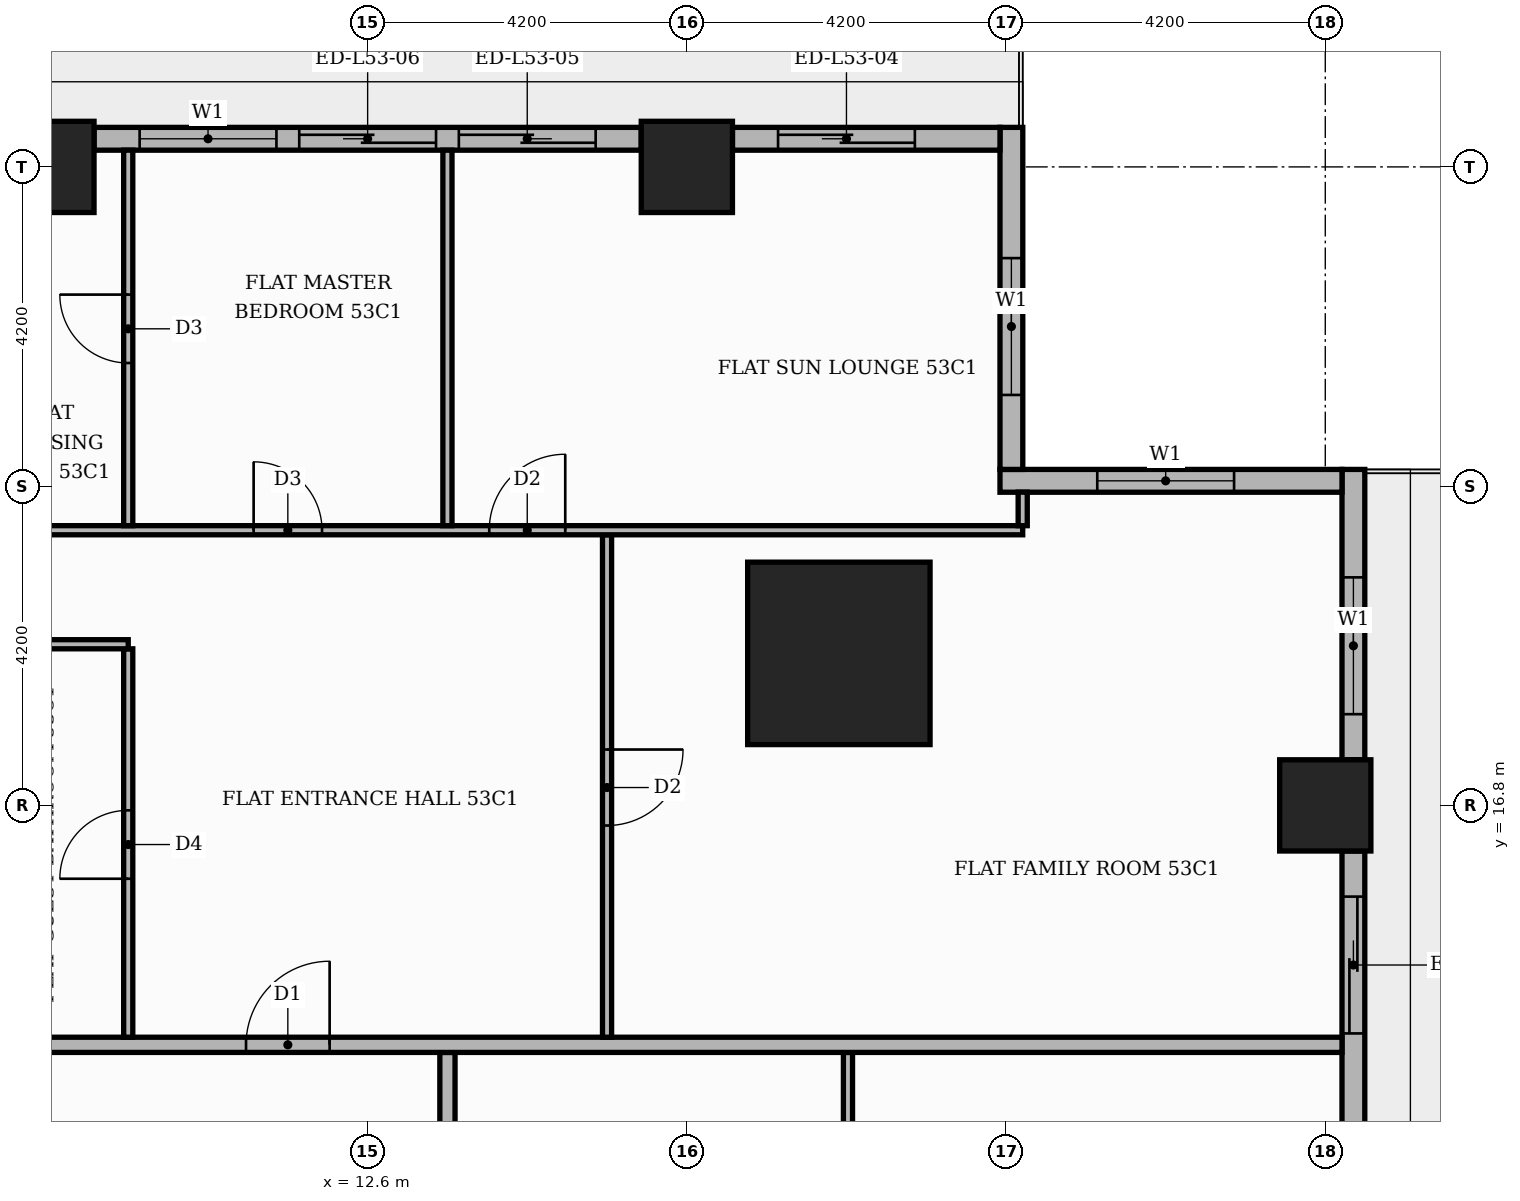
"""IFC4 building model, lengths in metres.
Left out: names, types, materials, properties, quantities, classifications, styles, units other than length and angle.
Written with IfcOpenShell. Run it as: python <this file> out.ifc"""

import sys

from ifc_helpers import new_model, si_unit, direction, frame, frame_2d, origin, origin_2d, place, context, subcontext, project, spatial, rectangle, extrude, element, fill, save


model = new_model("IFC4")
c1 = context("Model", 3, precision=1e-05, world=origin(), true_north=direction((0.0, 1.0)))
c2 = subcontext(c1, "Body", "Model", "MODEL_VIEW")
j1 = project(units=[si_unit("LENGTHUNIT", "METRE"), si_unit("PLANEANGLEUNIT", "RADIAN")], contexts=[c1])
p1 = place(None, origin())
s1 = spatial("IfcSite", under=j1, at=p1, CompositionType="ELEMENT")
p2 = place(p1, origin())
s2 = spatial("IfcBuilding", under=s1, at=p2, CompositionType="ELEMENT")
p3 = place(p2, frame((0.0, 0.0, 223.5)))
s3 = spatial("IfcBuildingStorey", under=s2, at=p3, CompositionType="ELEMENT", Elevation=223.5)
p4 = place(p3, frame((18.8, 18.8, 0.0), z_axis=(0.0, 0.0, 1.0), x_axis=(1.0, 0.0, 0.0)))
e1 = element("IfcColumn", 1, at=p4, inside=s3, PredefinedType="COLUMN", context=c2, shape_type="SweptSolid", body=[
    extrude(rectangle(XDim=2.4, YDim=2.4, at=origin_2d()), origin(), (0.0, 0.0, 1.0), 3.9),
])
for number, where, z_axis, x_axis in (
    (2, (25.2, 16.8, 0.0), (0.0, 0.0, 1.0), (1.0, 0.0, 0.0)),
    (3, (8.4, 25.2, 0.0), (0.0, 0.0, 1.0), (1.0, 0.0, 0.0)),
    (4, (16.8, 25.2, 0.0), (0.0, 0.0, 1.0), (1.0, 0.0, 0.0)),
):
    element("IfcColumn", number, at=place(p3, frame(where, z_axis=z_axis, x_axis=x_axis)), inside=s3, PredefinedType="COLUMN", context=c2, shape_type="SweptSolid", body=[
        extrude(rectangle(XDim=1.2, YDim=1.2, at=origin_2d()), origin(), (0.0, 0.0, 1.0), 3.9),
    ])
p5 = place(p3, frame((25.57, 11.85, 0.0), z_axis=(0.0, 0.0, 1.0), x_axis=(0.0, 1.0, 0.0)))
e5 = element("IfcWall", 5, at=p5, inside=s3, PredefinedType="STANDARD", context=c2, shape_type="SweptSolid", body=[
    extrude(rectangle(XDim=4.35, YDim=0.3, at=frame_2d((2.175, 0.0))), origin(), (0.0, 0.0, 1.0), 3.48),
])
p6 = place(p5, frame((1.95, 0.0, 0.0)))
e6 = element("IfcOpeningElement", 6, at=p6, cuts=e5, PredefinedType="OPENING", context=c2, shape_type="SweptSolid", body=[
    extrude(rectangle(XDim=1.8, YDim=2.4, at=frame_2d((0.9, 1.2))), frame((0.0, 0.16, 0.0), z_axis=(0.0, -1.0, 0.0), x_axis=(1.0, 0.0, 0.0)), (0.0, 0.0, 1.0), 0.32),
])
p7 = place(p3, frame((25.57, 17.4, 0.0), z_axis=(0.0, 0.0, 1.0), x_axis=(0.0, 1.0, 0.0)))
e7 = element("IfcWall", 7, at=p7, inside=s3, PredefinedType="STANDARD", context=c2, shape_type="SweptSolid", body=[
    extrude(rectangle(XDim=3.82, YDim=0.3, at=frame_2d((1.91, 0.0))), origin(), (0.0, 0.0, 1.0), 3.48),
])
p8 = place(p7, frame((0.6, 0.0, 0.9)))
e8 = element("IfcOpeningElement", 8, at=p8, cuts=e7, PredefinedType="OPENING", context=c2, shape_type="SweptSolid", body=[
    extrude(rectangle(XDim=1.8, YDim=2.1, at=frame_2d((0.9, 1.05))), frame((0.0, 0.16, 0.0), z_axis=(0.0, -1.0, 0.0), x_axis=(1.0, 0.0, 0.0)), (0.0, 0.0, 1.0), 0.32),
])
p9 = place(p3, frame((25.42, 21.07, 0.0), z_axis=(0.0, 0.0, 1.0), x_axis=(-1.0, 0.0, 0.0)))
e9 = element("IfcWall", 9, at=p9, inside=s3, PredefinedType="STANDARD", context=c2, shape_type="SweptSolid", body=[
    extrude(rectangle(XDim=4.5, YDim=0.3, at=frame_2d((2.25, 0.0))), origin(), (0.0, 0.0, 1.0), 3.48),
])
p10 = place(p9, frame((1.42, 0.0, 0.9)))
e10 = element("IfcOpeningElement", 10, at=p10, cuts=e9, PredefinedType="OPENING", context=c2, shape_type="SweptSolid", body=[
    extrude(rectangle(XDim=1.8, YDim=2.1, at=frame_2d((0.9, 1.05))), frame((0.0, 0.16, 0.0), z_axis=(0.0, -1.0, 0.0), x_axis=(1.0, 0.0, 0.0)), (0.0, 0.0, 1.0), 0.32),
])
p11 = place(p3, frame((21.07, 21.22, 0.0), z_axis=(0.0, 0.0, 1.0), x_axis=(0.0, 1.0, 0.0)))
e11 = element("IfcWall", 11, at=p11, inside=s3, PredefinedType="STANDARD", context=c2, shape_type="SweptSolid", body=[
    extrude(rectangle(XDim=4.5, YDim=0.3, at=frame_2d((2.25, 0.0))), origin(), (0.0, 0.0, 1.0), 3.48),
])
p12 = place(p11, frame((0.98, 0.0, 0.9)))
e12 = element("IfcOpeningElement", 12, at=p12, cuts=e11, PredefinedType="OPENING", context=c2, shape_type="SweptSolid", body=[
    extrude(rectangle(XDim=1.8, YDim=2.1, at=frame_2d((0.9, 1.05))), frame((0.0, 0.16, 0.0), z_axis=(0.0, -1.0, 0.0), x_axis=(1.0, 0.0, 0.0)), (0.0, 0.0, 1.0), 0.32),
])
p13 = place(p3, frame((20.92, 25.57, 0.0), z_axis=(0.0, 0.0, 1.0), x_axis=(-1.0, 0.0, 0.0)))
e13 = element("IfcWall", 13, at=p13, inside=s3, PredefinedType="STANDARD", context=c2, shape_type="SweptSolid", body=[
    extrude(rectangle(XDim=3.52, YDim=0.3, at=frame_2d((1.76, 0.0))), origin(), (0.0, 0.0, 1.0), 3.48),
])
p14 = place(p13, frame((1.12, 0.0, 0.0)))
e14 = element("IfcOpeningElement", 14, at=p14, cuts=e13, PredefinedType="OPENING", context=c2, shape_type="SweptSolid", body=[
    extrude(rectangle(XDim=1.8, YDim=2.4, at=frame_2d((0.9, 1.2))), frame((0.0, 0.16, 0.0), z_axis=(0.0, -1.0, 0.0), x_axis=(1.0, 0.0, 0.0)), (0.0, 0.0, 1.0), 0.32),
])
p15 = place(p3, frame((16.2, 25.57, 0.0), z_axis=(0.0, 0.0, 1.0), x_axis=(-1.0, 0.0, 0.0)))
e15 = element("IfcWall", 15, at=p15, inside=s3, PredefinedType="STANDARD", context=c2, shape_type="SweptSolid", body=[
    extrude(rectangle(XDim=7.2, YDim=0.3, at=frame_2d((3.6, 0.0))), origin(), (0.0, 0.0, 1.0), 3.48),
])
p16 = place(p15, frame((0.6, 0.0, 0.0)))
e16 = element("IfcOpeningElement", 16, at=p16, cuts=e15, PredefinedType="OPENING", context=c2, shape_type="SweptSolid", body=[
    extrude(rectangle(XDim=1.8, YDim=2.4, at=frame_2d((0.9, 1.2))), frame((0.0, 0.16, 0.0), z_axis=(0.0, -1.0, 0.0), x_axis=(1.0, 0.0, 0.0)), (0.0, 0.0, 1.0), 0.32),
])
p17 = place(p15, frame((2.7, 0.0, 0.0)))
e17 = element("IfcOpeningElement", 17, at=p17, cuts=e15, PredefinedType="OPENING", context=c2, shape_type="SweptSolid", body=[
    extrude(rectangle(XDim=1.8, YDim=2.4, at=frame_2d((0.9, 1.2))), frame((0.0, 0.16, 0.0), z_axis=(0.0, -1.0, 0.0), x_axis=(1.0, 0.0, 0.0)), (0.0, 0.0, 1.0), 0.32),
])
p18 = place(p15, frame((4.8, 0.0, 0.9)))
e18 = element("IfcOpeningElement", 18, at=p18, cuts=e15, PredefinedType="OPENING", context=c2, shape_type="SweptSolid", body=[
    extrude(rectangle(XDim=1.8, YDim=2.1, at=frame_2d((0.9, 1.05))), frame((0.0, 0.16, 0.0), z_axis=(0.0, -1.0, 0.0), x_axis=(1.0, 0.0, 0.0)), (0.0, 0.0, 1.0), 0.32),
])
p19 = place(p3, frame((18.92, 9.36, 0.0), z_axis=(0.0, 0.0, 1.0), x_axis=(0.0, 1.0, 0.0)))
e19 = element("IfcWall", 19, at=p19, inside=s3, PredefinedType="PARTITIONING", context=c2, shape_type="SweptSolid", body=[
    extrude(rectangle(XDim=4.19, YDim=0.12, at=frame_2d((2.095, 0.0))), origin(), (0.0, 0.0, 1.0), 3.48),
])
p20 = place(p19, frame((1.665, 0.0, 0.0)))
e20 = element("IfcOpeningElement", 20, at=p20, cuts=e19, PredefinedType="OPENING", context=c2, shape_type="SweptSolid", body=[
    extrude(rectangle(XDim=0.9, YDim=2.1, at=frame_2d((0.45, 1.05))), frame((0.0, 0.07, 0.0), z_axis=(0.0, -1.0, 0.0), x_axis=(1.0, 0.0, 0.0)), (0.0, 0.0, 1.0), 0.14),
])
p21 = place(p3, frame((13.65, 11.1, 0.0), z_axis=(0.0, 0.0, 1.0), x_axis=(0.0, 1.0, 0.0)))
e21 = element("IfcWall", 21, at=p21, inside=s3, PredefinedType="PARTITIONING", context=c2, shape_type="SweptSolid", body=[
    extrude(rectangle(XDim=2.45, YDim=0.2, at=frame_2d((1.225, 0.0))), origin(), (0.0, 0.0, 1.0), 3.48),
])
p22 = place(p3, frame((-13.65, 13.65, 0.0), z_axis=(0.0, 0.0, 1.0), x_axis=(1.0, 0.0, 0.0)))
e22 = element("IfcWall", 22, at=p22, inside=s3, PredefinedType="PARTITIONING", context=c2, shape_type="SweptSolid", body=[
    extrude(rectangle(XDim=39.07, YDim=0.2, at=frame_2d((19.535, 0.0))), origin(), (0.0, 0.0, 1.0), 3.48),
])
p23 = place(p22, frame((24.65, 0.0, 0.0)))
e23 = element("IfcOpeningElement", 23, at=p23, cuts=e22, PredefinedType="OPENING", context=c2, shape_type="SweptSolid", body=[
    extrude(rectangle(XDim=1.1, YDim=2.4, at=frame_2d((0.55, 1.2))), frame((0.0, 0.11, 0.0), z_axis=(0.0, -1.0, 0.0), x_axis=(1.0, 0.0, 0.0)), (0.0, 0.0, 1.0), 0.22),
])
p24 = place(p22, frame((14.15, 0.0, 0.0)))
e24 = element("IfcOpeningElement", 24, at=p24, cuts=e22, PredefinedType="OPENING", context=c2, shape_type="SweptSolid", body=[
    extrude(rectangle(XDim=1.1, YDim=2.4, at=frame_2d((0.55, 1.2))), frame((0.0, 0.11, 0.0), z_axis=(0.0, -1.0, 0.0), x_axis=(1.0, 0.0, 0.0)), (0.0, 0.0, 1.0), 0.22),
])
p25 = place(p3, frame((9.45, 13.75, 0.0), z_axis=(0.0, 0.0, 1.0), x_axis=(0.0, 1.0, 0.0)))
e25 = element("IfcWall", 25, at=p25, inside=s3, PredefinedType="PARTITIONING", context=c2, shape_type="SweptSolid", body=[
    extrude(rectangle(XDim=5.11, YDim=0.12, at=frame_2d((2.555, 0.0))), origin(), (0.0, 0.0, 1.0), 3.48),
])
p26 = place(p25, frame((2.085, 0.0, 0.0)))
e26 = element("IfcOpeningElement", 26, at=p26, cuts=e25, PredefinedType="OPENING", context=c2, shape_type="SweptSolid", body=[
    extrude(rectangle(XDim=0.9, YDim=2.1, at=frame_2d((0.45, 1.05))), frame((0.0, 0.07, 0.0), z_axis=(0.0, -1.0, 0.0), x_axis=(1.0, 0.0, 0.0)), (0.0, 0.0, 1.0), 0.14),
])
p27 = place(p3, frame((15.75, 13.75, 0.0), z_axis=(0.0, 0.0, 1.0), x_axis=(0.0, 1.0, 0.0)))
e27 = element("IfcWall", 27, at=p27, inside=s3, PredefinedType="PARTITIONING", context=c2, shape_type="SweptSolid", body=[
    extrude(rectangle(XDim=6.61, YDim=0.12, at=frame_2d((3.305, 0.0))), origin(), (0.0, 0.0, 1.0), 3.48),
])
p28 = place(p27, frame((2.785, 0.0, 0.0)))
e28 = element("IfcOpeningElement", 28, at=p28, cuts=e27, PredefinedType="OPENING", context=c2, shape_type="SweptSolid", body=[
    extrude(rectangle(XDim=1.0, YDim=2.1, at=frame_2d((0.5, 1.05))), frame((0.0, 0.07, 0.0), z_axis=(0.0, -1.0, 0.0), x_axis=(1.0, 0.0, 0.0)), (0.0, 0.0, 1.0), 0.14),
])
p29 = place(p3, frame((5.35, 18.92, 0.0), z_axis=(0.0, 0.0, 1.0), x_axis=(1.0, 0.0, 0.0)))
e29 = element("IfcWall", 29, at=p29, inside=s3, PredefinedType="PARTITIONING", context=c2, shape_type="SweptSolid", body=[
    extrude(rectangle(XDim=4.1, YDim=0.12, at=frame_2d((2.05, 0.0))), origin(), (0.0, 0.0, 1.0), 3.48),
])
p30 = place(p29, frame((0.5, 0.0, 0.0)))
e30 = element("IfcOpeningElement", 30, at=p30, cuts=e29, PredefinedType="OPENING", context=c2, shape_type="SweptSolid", body=[
    extrude(rectangle(XDim=0.9, YDim=2.1, at=frame_2d((0.45, 1.05))), frame((0.0, 0.07, 0.0), z_axis=(0.0, -1.0, 0.0), x_axis=(1.0, 0.0, 0.0)), (0.0, 0.0, 1.0), 0.14),
])
p31 = place(p3, frame((5.35, 20.42, 0.0), z_axis=(0.0, 0.0, 1.0), x_axis=(1.0, 0.0, 0.0)))
e31 = element("IfcWall", 31, at=p31, inside=s3, PredefinedType="PARTITIONING", context=c2, shape_type="SweptSolid", body=[
    extrude(rectangle(XDim=15.869, YDim=0.12, at=frame_2d((7.935, 0.0))), origin(), (0.0, 0.0, 1.0), 3.48),
])
p32 = place(p31, frame((8.85, 0.0, 0.0)))
e32 = element("IfcOpeningElement", 32, at=p32, cuts=e31, PredefinedType="OPENING", context=c2, shape_type="SweptSolid", body=[
    extrude(rectangle(XDim=1.0, YDim=2.1, at=frame_2d((0.5, 1.05))), frame((0.0, 0.07, 0.0), z_axis=(0.0, -1.0, 0.0), x_axis=(1.0, 0.0, 0.0)), (0.0, 0.0, 1.0), 0.14),
])
p33 = place(p31, frame((5.75, 0.0, 0.0)))
e33 = element("IfcOpeningElement", 33, at=p33, cuts=e31, PredefinedType="OPENING", context=c2, shape_type="SweptSolid", body=[
    extrude(rectangle(XDim=0.9, YDim=2.1, at=frame_2d((0.45, 1.05))), frame((0.0, 0.07, 0.0), z_axis=(0.0, -1.0, 0.0), x_axis=(1.0, 0.0, 0.0)), (0.0, 0.0, 1.0), 0.14),
])
p34 = place(p3, frame((9.45, 20.48, 0.0), z_axis=(0.0, 0.0, 1.0), x_axis=(0.0, 1.0, 0.0)))
e34 = element("IfcWall", 34, at=p34, inside=s3, PredefinedType="PARTITIONING", context=c2, shape_type="SweptSolid", body=[
    extrude(rectangle(XDim=4.94, YDim=0.12, at=frame_2d((2.47, 0.0))), origin(), (0.0, 0.0, 1.0), 3.48),
])
p35 = place(p34, frame((2.14, 0.0, 0.0)))
e35 = element("IfcOpeningElement", 35, at=p35, cuts=e34, PredefinedType="OPENING", context=c2, shape_type="SweptSolid", body=[
    extrude(rectangle(XDim=0.9, YDim=2.1, at=frame_2d((0.45, 1.05))), frame((0.0, 0.07, 0.0), z_axis=(0.0, -1.0, 0.0), x_axis=(1.0, 0.0, 0.0)), (0.0, 0.0, 1.0), 0.14),
])
p36 = place(p3, frame((13.65, 20.48, 0.0), z_axis=(0.0, 0.0, 1.0), x_axis=(0.0, 1.0, 0.0)))
e36 = element("IfcWall", 36, at=p36, inside=s3, PredefinedType="PARTITIONING", context=c2, shape_type="SweptSolid", body=[
    extrude(rectangle(XDim=4.94, YDim=0.12, at=frame_2d((2.47, 0.0))), origin(), (0.0, 0.0, 1.0), 3.48),
])
p37 = place(p3, frame((21.219, 20.48, 0.0), z_axis=(0.0, 0.0, 1.0), x_axis=(0.0, 1.0, 0.0)))
e37 = element("IfcWall", 37, at=p37, inside=s3, PredefinedType="PARTITIONING", context=c2, shape_type="SweptSolid", body=[
    extrude(rectangle(XDim=0.441, YDim=0.12, at=frame_2d((0.22, 0.0))), origin(), (0.0, 0.0, 1.0), 3.48),
])
p38 = place(p6, origin())
e38 = element("IfcDoor", 38, at=p38, inside=s3, OperationType="SLIDING_TO_RIGHT", PredefinedType="DOOR", context=c2, shape_type="SweptSolid", body=[
    extrude(rectangle(XDim=1.8, YDim=2.4, at=frame_2d((0.9, 1.2))), frame((0.0, 0.025, 0.0), z_axis=(0.0, -1.0, 0.0), x_axis=(1.0, 0.0, 0.0)), (0.0, 0.0, 1.0), 0.05),
])
fill(e6, e38)
p39 = place(p8, origin())
e39 = element("IfcWindow", 39, at=p39, inside=s3, PartitioningType="SINGLE_PANEL", PredefinedType="WINDOW", context=c2, shape_type="SweptSolid", body=[
    extrude(rectangle(XDim=1.8, YDim=2.1, at=frame_2d((0.9, 1.05))), frame((0.0, 0.03, 0.0), z_axis=(0.0, -1.0, 0.0), x_axis=(1.0, 0.0, 0.0)), (0.0, 0.0, 1.0), 0.06),
])
fill(e8, e39)
p40 = place(p10, origin())
e40 = element("IfcWindow", 40, at=p40, inside=s3, PartitioningType="SINGLE_PANEL", PredefinedType="WINDOW", context=c2, shape_type="SweptSolid", body=[
    extrude(rectangle(XDim=1.8, YDim=2.1, at=frame_2d((0.9, 1.05))), frame((0.0, 0.03, 0.0), z_axis=(0.0, -1.0, 0.0), x_axis=(1.0, 0.0, 0.0)), (0.0, 0.0, 1.0), 0.06),
])
fill(e10, e40)
p41 = place(p12, origin())
e41 = element("IfcWindow", 41, at=p41, inside=s3, PartitioningType="SINGLE_PANEL", PredefinedType="WINDOW", context=c2, shape_type="SweptSolid", body=[
    extrude(rectangle(XDim=1.8, YDim=2.1, at=frame_2d((0.9, 1.05))), frame((0.0, 0.03, 0.0), z_axis=(0.0, -1.0, 0.0), x_axis=(1.0, 0.0, 0.0)), (0.0, 0.0, 1.0), 0.06),
])
fill(e12, e41)
p42 = place(p14, origin())
e42 = element("IfcDoor", 42, at=p42, inside=s3, OperationType="SLIDING_TO_RIGHT", PredefinedType="DOOR", context=c2, shape_type="SweptSolid", body=[
    extrude(rectangle(XDim=1.8, YDim=2.4, at=frame_2d((0.9, 1.2))), frame((0.0, 0.025, 0.0), z_axis=(0.0, -1.0, 0.0), x_axis=(1.0, 0.0, 0.0)), (0.0, 0.0, 1.0), 0.05),
])
fill(e14, e42)
p43 = place(p16, origin())
e43 = element("IfcDoor", 43, at=p43, inside=s3, OperationType="SLIDING_TO_LEFT", PredefinedType="DOOR", context=c2, shape_type="SweptSolid", body=[
    extrude(rectangle(XDim=1.8, YDim=2.4, at=frame_2d((0.9, 1.2))), frame((0.0, 0.025, 0.0), z_axis=(0.0, -1.0, 0.0), x_axis=(1.0, 0.0, 0.0)), (0.0, 0.0, 1.0), 0.05),
])
fill(e16, e43)
p44 = place(p17, origin())
e44 = element("IfcDoor", 44, at=p44, inside=s3, OperationType="SLIDING_TO_RIGHT", PredefinedType="DOOR", context=c2, shape_type="SweptSolid", body=[
    extrude(rectangle(XDim=1.8, YDim=2.4, at=frame_2d((0.9, 1.2))), frame((0.0, 0.025, 0.0), z_axis=(0.0, -1.0, 0.0), x_axis=(1.0, 0.0, 0.0)), (0.0, 0.0, 1.0), 0.05),
])
fill(e17, e44)
p45 = place(p18, origin())
e45 = element("IfcWindow", 45, at=p45, inside=s3, PartitioningType="SINGLE_PANEL", PredefinedType="WINDOW", context=c2, shape_type="SweptSolid", body=[
    extrude(rectangle(XDim=1.8, YDim=2.1, at=frame_2d((0.9, 1.05))), frame((0.0, 0.03, 0.0), z_axis=(0.0, -1.0, 0.0), x_axis=(1.0, 0.0, 0.0)), (0.0, 0.0, 1.0), 0.06),
])
fill(e18, e45)
p46 = place(p23, origin())
e46 = element("IfcDoor", 46, at=p46, inside=s3, OperationType="SINGLE_SWING_RIGHT", PredefinedType="DOOR", context=c2, shape_type="SweptSolid", body=[
    extrude(rectangle(XDim=1.1, YDim=2.4, at=frame_2d((0.55, 1.2))), frame((0.0, 0.025, 0.0), z_axis=(0.0, -1.0, 0.0), x_axis=(1.0, 0.0, 0.0)), (0.0, 0.0, 1.0), 0.05),
])
fill(e23, e46)
p47 = place(p28, frame((1.0, 0.0, 0.0), z_axis=(0.0, 0.0, 1.0), x_axis=(-1.0, 0.0, 0.0)))
e47 = element("IfcDoor", 47, at=p47, inside=s3, OperationType="SINGLE_SWING_RIGHT", PredefinedType="DOOR", context=c2, shape_type="SweptSolid", body=[
    extrude(rectangle(XDim=1.0, YDim=2.1, at=frame_2d((0.5, 1.05))), frame((0.0, 0.025, 0.0), z_axis=(0.0, -1.0, 0.0), x_axis=(1.0, 0.0, 0.0)), (0.0, 0.0, 1.0), 0.05),
])
fill(e28, e47)
p48 = place(p26, origin())
e48 = element("IfcDoor", 48, at=p48, inside=s3, OperationType="SINGLE_SWING_LEFT", PredefinedType="DOOR", context=c2, shape_type="SweptSolid", body=[
    extrude(rectangle(XDim=0.9, YDim=2.1, at=frame_2d((0.45, 1.05))), frame((0.0, 0.025, 0.0), z_axis=(0.0, -1.0, 0.0), x_axis=(1.0, 0.0, 0.0)), (0.0, 0.0, 1.0), 0.05),
])
fill(e26, e48)
p49 = place(p32, origin())
e49 = element("IfcDoor", 49, at=p49, inside=s3, OperationType="SINGLE_SWING_RIGHT", PredefinedType="DOOR", context=c2, shape_type="SweptSolid", body=[
    extrude(rectangle(XDim=1.0, YDim=2.1, at=frame_2d((0.5, 1.05))), frame((0.0, 0.025, 0.0), z_axis=(0.0, -1.0, 0.0), x_axis=(1.0, 0.0, 0.0)), (0.0, 0.0, 1.0), 0.05),
])
fill(e32, e49)
p50 = place(p33, origin())
e50 = element("IfcDoor", 50, at=p50, inside=s3, OperationType="SINGLE_SWING_LEFT", PredefinedType="DOOR", context=c2, shape_type="SweptSolid", body=[
    extrude(rectangle(XDim=0.9, YDim=2.1, at=frame_2d((0.45, 1.05))), frame((0.0, 0.025, 0.0), z_axis=(0.0, -1.0, 0.0), x_axis=(1.0, 0.0, 0.0)), (0.0, 0.0, 1.0), 0.05),
])
fill(e33, e50)
p51 = place(p35, origin())
e51 = element("IfcDoor", 51, at=p51, inside=s3, OperationType="SINGLE_SWING_RIGHT", PredefinedType="DOOR", context=c2, shape_type="SweptSolid", body=[
    extrude(rectangle(XDim=0.9, YDim=2.1, at=frame_2d((0.45, 1.05))), frame((0.0, 0.025, 0.0), z_axis=(0.0, -1.0, 0.0), x_axis=(1.0, 0.0, 0.0)), (0.0, 0.0, 1.0), 0.05),
])
fill(e35, e51)
save(model, sys.argv[1])
